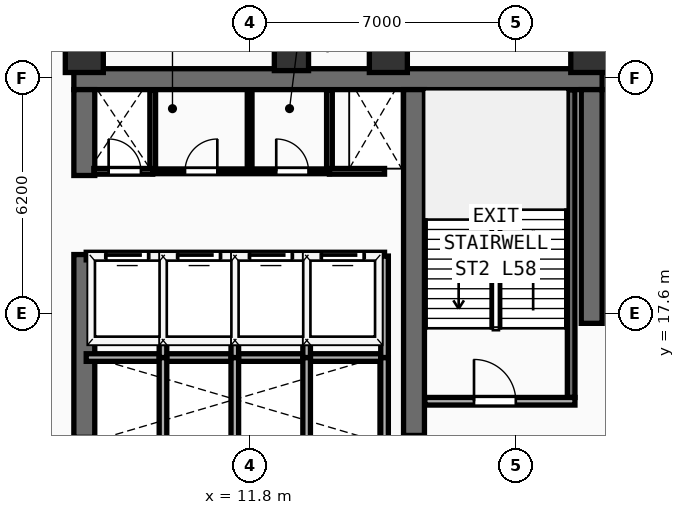
"""IFC4 building model, lengths in metres.
Left out: names, types, materials, properties, quantities, classifications, styles, units other than length and angle.
Written with IfcOpenShell. Run it as: python <this file> out.ifc"""

import sys

from ifc_helpers import new_model, si_unit, direction, frame, frame_2d, origin, origin_2d, place, context, subcontext, project, spatial, rectangle, extrude, element, fill, save


model = new_model("IFC4")
c1 = context("Model", 3, precision=1e-05, world=origin(), true_north=direction((0.0, 1.0)))
c2 = subcontext(c1, "Body", "Model", "MODEL_VIEW")
j1 = project(units=[si_unit("LENGTHUNIT", "METRE"), si_unit("PLANEANGLEUNIT", "RADIAN")], contexts=[c1])
p1 = place(None, origin())
s1 = spatial("IfcSite", under=j1, at=p1, CompositionType="ELEMENT")
p2 = place(p1, origin())
s2 = spatial("IfcBuilding", under=s1, at=p2, CompositionType="ELEMENT")
p3 = place(p2, frame((0.0, 0.0, 227.3)))
s3 = spatial("IfcBuildingStorey", under=s2, at=p3, CompositionType="ELEMENT", Elevation=227.3)
p4 = place(p3, frame((7.175, 23.775, 0.0), z_axis=(0.0, 0.0, 1.0), x_axis=(1.0, 0.0, 0.0)))
e1 = element("IfcWall", 1, at=p4, inside=s3, PredefinedType="SHEAR", context=c2, shape_type="SweptSolid", body=[
    extrude(rectangle(XDim=13.9, YDim=0.55, at=frame_2d((6.95, 0.0))), origin(), (0.0, 0.0, 1.0), 3.56),
])
p5 = place(p3, frame((7.45, 14.35, 0.0), z_axis=(0.0, 0.0, 1.0), x_axis=(0.0, 1.0, 0.0)))
e2 = element("IfcWall", 2, at=p5, inside=s3, PredefinedType="SHEAR", context=c2, shape_type="SweptSolid", body=[
    extrude(rectangle(XDim=4.81, YDim=0.55, at=frame_2d((2.405, 0.0))), origin(), (0.0, 0.0, 1.0), 3.56),
])
p6 = place(p3, frame((7.45, 21.24, 0.0), z_axis=(0.0, 0.0, 1.0), x_axis=(0.0, 1.0, 0.0)))
e3 = element("IfcWall", 3, at=p6, inside=s3, PredefinedType="SHEAR", context=c2, shape_type="SweptSolid", body=[
    extrude(rectangle(XDim=2.26, YDim=0.55, at=frame_2d((1.13, 0.0))), origin(), (0.0, 0.0, 1.0), 3.56),
])
p7 = place(p3, frame((20.8, 17.35, 0.0), z_axis=(0.0, 0.0, 1.0), x_axis=(0.0, 1.0, 0.0)))
e4 = element("IfcWall", 4, at=p7, inside=s3, PredefinedType="SHEAR", context=c2, shape_type="SweptSolid", body=[
    extrude(rectangle(XDim=6.15, YDim=0.55, at=frame_2d((3.075, 0.0))), origin(), (0.0, 0.0, 1.0), 3.56),
])
p8 = place(p3, frame((16.125, 14.4, 0.0), z_axis=(0.0, 0.0, 1.0), x_axis=(0.0, 1.0, 0.0)))
e5 = element("IfcWall", 5, at=p8, inside=s3, PredefinedType="SHEAR", context=c2, shape_type="SweptSolid", body=[
    extrude(rectangle(XDim=9.1, YDim=0.55, at=frame_2d((4.55, 0.0))), origin(), (0.0, 0.0, 1.0), 3.56),
])
for number, where, z_axis, x_axis in (
    (6, (7.45, 24.45, 0.0), (0.0, 0.0, 1.0), (1.0, 0.0, 0.0)),
    (7, (15.45, 24.45, 0.0), (0.0, 0.0, 1.0), (1.0, 0.0, 0.0)),
    (8, (20.75, 24.45, 0.0), (0.0, 0.0, 1.0), (1.0, 0.0, 0.0)),
):
    element("IfcColumn", number, at=place(p3, frame(where, z_axis=z_axis, x_axis=x_axis)), inside=s3, PredefinedType="COLUMN", context=c2, shape_type="SweptSolid", body=[
        extrude(rectangle(XDim=1.0, YDim=1.0, at=origin_2d()), origin(), (0.0, 0.0, 1.0), 3.56),
    ])
p9 = place(p3, frame((12.9, 24.45, 0.0), z_axis=(0.0, 0.0, 1.0), x_axis=(1.0, 0.0, 0.0)))
e9 = element("IfcColumn", 9, at=p9, inside=s3, PredefinedType="COLUMN", context=c2, shape_type="SweptSolid", body=[
    extrude(rectangle(XDim=0.9, YDim=0.9, at=origin_2d()), origin(), (0.0, 0.0, 1.0), 3.56),
])
p10 = place(p3, frame((27.685, 19.775, 0.0), z_axis=(0.0, 0.0, 1.0), x_axis=(-0.707106781187, 0.707106781187, 0.0)))
e10 = element("IfcWall", 10, at=p10, inside=s3, PredefinedType="SOLIDWALL", context=c2, shape_type="SweptSolid", body=[
    extrude(rectangle(XDim=9.207, YDim=0.28, at=frame_2d((4.603, 0.0))), origin(), (0.0, 0.0, 1.0), 3.56),
])
p11 = place(p3, frame((20.26, 15.4, 0.0), z_axis=(0.0, 0.0, 1.0), x_axis=(0.0, 1.0, 0.0)))
e11 = element("IfcWall", 11, at=p11, inside=s3, PredefinedType="SHEAR", context=c2, shape_type="SweptSolid", body=[
    extrude(rectangle(XDim=8.09, YDim=0.2, at=frame_2d((4.045, 0.0))), origin(), (0.0, 0.0, 1.0), 3.56),
])
p12 = place(p3, frame((16.41, 15.3, 0.0), z_axis=(0.0, 0.0, 1.0), x_axis=(1.0, 0.0, 0.0)))
e12 = element("IfcWall", 12, at=p12, inside=s3, PredefinedType="PARTITIONING", context=c2, shape_type="SweptSolid", body=[
    extrude(rectangle(XDim=3.95, YDim=0.2, at=frame_2d((1.975, 0.0))), origin(), (0.0, 0.0, 1.0), 3.56),
])
p13 = place(p12, frame((1.294, 0.0, 0.0)))
e13 = element("IfcOpeningElement", 13, at=p13, cuts=e12, PredefinedType="OPENING", context=c2, shape_type="SweptSolid", body=[
    extrude(rectangle(XDim=1.1, YDim=2.2, at=frame_2d((0.55, 1.1))), frame((0.0, 0.11, 0.0), z_axis=(0.0, -1.0, 0.0), x_axis=(1.0, 0.0, 0.0)), (0.0, 0.0, 1.0), 0.22),
])
p14 = place(p3, frame((7.5, 16.45, 0.0), z_axis=(0.0, 0.0, 1.0), x_axis=(1.0, 0.0, 0.0)))
e14 = element("IfcWall", 14, at=p14, inside=s3, PredefinedType="PARTITIONING", context=c2, shape_type="SweptSolid", body=[
    extrude(rectangle(XDim=7.85, YDim=0.2, at=frame_2d((3.925, 0.0))), origin(), (0.0, 0.0, 1.0), 3.56),
])
for number, where, z_axis, x_axis in (
    (15, (15.35, 14.22, 0.0), (0.0, 0.0, 1.0), (0.0, 1.0, 0.0)),
    (16, (9.52, 14.22, 0.0), (0.0, 0.0, 1.0), (0.0, 1.0, 0.0)),
    (17, (11.41, 14.22, 0.0), (0.0, 0.0, 1.0), (0.0, 1.0, 0.0)),
    (18, (13.3, 14.22, 0.0), (0.0, 0.0, 1.0), (0.0, 1.0, 0.0)),
):
    element("IfcWall", number, at=place(p3, frame(where, z_axis=z_axis, x_axis=x_axis)), inside=s3, PredefinedType="PARTITIONING", context=c2, shape_type="SweptSolid", body=[
        extrude(rectangle(XDim=2.23, YDim=0.2, at=frame_2d((1.115, 0.0))), origin(), (0.0, 0.0, 1.0), 3.56),
    ])
p15 = place(p3, frame((7.5, 19.12, 0.0), z_axis=(0.0, 0.0, 1.0), x_axis=(1.0, 0.0, 0.0)))
e19 = element("IfcWall", 19, at=p15, inside=s3, PredefinedType="PARTITIONING", context=c2, shape_type="SweptSolid", body=[
    extrude(rectangle(XDim=7.85, YDim=0.2, at=frame_2d((3.925, 0.0))), origin(), (0.0, 0.0, 1.0), 3.56),
])
p16 = place(p15, frame((0.53, 0.0, 0.0)))
e20 = element("IfcOpeningElement", 20, at=p16, cuts=e19, PredefinedType="OPENING", context=c2, shape_type="SweptSolid", body=[
    extrude(rectangle(XDim=1.1, YDim=2.2, at=frame_2d((0.55, 1.1))), frame((0.0, 0.11, 0.0), z_axis=(0.0, -1.0, 0.0), x_axis=(1.0, 0.0, 0.0)), (0.0, 0.0, 1.0), 0.22),
])
p17 = place(p15, frame((2.42, 0.0, 0.0)))
e21 = element("IfcOpeningElement", 21, at=p17, cuts=e19, PredefinedType="OPENING", context=c2, shape_type="SweptSolid", body=[
    extrude(rectangle(XDim=1.1, YDim=2.2, at=frame_2d((0.55, 1.1))), frame((0.0, 0.11, 0.0), z_axis=(0.0, -1.0, 0.0), x_axis=(1.0, 0.0, 0.0)), (0.0, 0.0, 1.0), 0.22),
])
p18 = place(p15, frame((4.31, 0.0, 0.0)))
e22 = element("IfcOpeningElement", 22, at=p18, cuts=e19, PredefinedType="OPENING", context=c2, shape_type="SweptSolid", body=[
    extrude(rectangle(XDim=1.1, YDim=2.2, at=frame_2d((0.55, 1.1))), frame((0.0, 0.11, 0.0), z_axis=(0.0, -1.0, 0.0), x_axis=(1.0, 0.0, 0.0)), (0.0, 0.0, 1.0), 0.22),
])
p19 = place(p15, frame((6.2, 0.0, 0.0)))
e23 = element("IfcOpeningElement", 23, at=p19, cuts=e19, PredefinedType="OPENING", context=c2, shape_type="SweptSolid", body=[
    extrude(rectangle(XDim=1.1, YDim=2.2, at=frame_2d((0.55, 1.1))), frame((0.0, 0.11, 0.0), z_axis=(0.0, -1.0, 0.0), x_axis=(1.0, 0.0, 0.0)), (0.0, 0.0, 1.0), 0.22),
])
for number, where, z_axis, x_axis in (
    (24, (15.35, 16.45, 0.0), (0.0, 0.0, 1.0), (0.0, 1.0, 0.0)),
    (25, (9.52, 16.45, 0.0), (0.0, 0.0, 1.0), (0.0, 1.0, 0.0)),
    (26, (11.41, 16.45, 0.0), (0.0, 0.0, 1.0), (0.0, 1.0, 0.0)),
    (27, (13.3, 16.45, 0.0), (0.0, 0.0, 1.0), (0.0, 1.0, 0.0)),
):
    element("IfcWall", number, at=place(p3, frame(where, z_axis=z_axis, x_axis=x_axis)), inside=s3, PredefinedType="PARTITIONING", context=c2, shape_type="SweptSolid", body=[
        extrude(rectangle(XDim=2.67, YDim=0.2, at=frame_2d((1.335, 0.0))), origin(), (0.0, 0.0, 1.0), 3.56),
    ])
for number, where, z_axis, x_axis in (
    (28, (9.25, 21.35, 0.0), (0.0, 0.0, 1.0), (0.0, 1.0, 0.0)),
    (29, (13.9, 21.35, 0.0), (0.0, 0.0, 1.0), (0.0, 1.0, 0.0)),
):
    element("IfcWall", number, at=place(p3, frame(where, z_axis=z_axis, x_axis=x_axis)), inside=s3, PredefinedType="PARTITIONING", context=c2, shape_type="SweptSolid", body=[
        extrude(rectangle(XDim=2.13, YDim=0.15, at=frame_2d((1.065, 0.0))), origin(), (0.0, 0.0, 1.0), 3.56),
    ])
p20 = place(p3, frame((7.7, 21.35, 0.0), z_axis=(0.0, 0.0, 1.0), x_axis=(1.0, 0.0, 0.0)))
e30 = element("IfcWall", 30, at=p20, inside=s3, PredefinedType="PARTITIONING", context=c2, shape_type="SweptSolid", body=[
    extrude(rectangle(XDim=1.55, YDim=0.15, at=frame_2d((0.775, 0.0))), origin(), (0.0, 0.0, 1.0), 3.56),
])
p21 = place(p20, frame((0.39, 0.0, 0.0)))
e31 = element("IfcOpeningElement", 31, at=p21, cuts=e30, PredefinedType="OPENING", context=c2, shape_type="SweptSolid", body=[
    extrude(rectangle(XDim=0.85, YDim=2.15, at=frame_2d((0.425, 1.075))), frame((0.0, 0.085, 0.0), z_axis=(0.0, -1.0, 0.0), x_axis=(1.0, 0.0, 0.0)), (0.0, 0.0, 1.0), 0.17),
])
p22 = place(p3, frame((13.9, 21.35, 0.0), z_axis=(0.0, 0.0, 1.0), x_axis=(1.0, 0.0, 0.0)))
e32 = element("IfcWall", 32, at=p22, inside=s3, PredefinedType="PARTITIONING", context=c2, shape_type="SweptSolid", body=[
    extrude(rectangle(XDim=1.45, YDim=0.15, at=frame_2d((0.725, 0.0))), origin(), (0.0, 0.0, 1.0), 3.56),
])
p23 = place(p3, frame((9.25, 21.35, 0.0), z_axis=(0.0, 0.0, 1.0), x_axis=(1.0, 0.0, 0.0)))
e33 = element("IfcWall", 33, at=p23, inside=s3, PredefinedType="PARTITIONING", context=c2, shape_type="SweptSolid", body=[
    extrude(rectangle(XDim=4.65, YDim=0.125, at=frame_2d((2.325, 0.0))), origin(), (0.0, 0.0, 1.0), 3.56),
])
p24 = place(p23, frame((0.85, 0.0, 0.0)))
e34 = element("IfcOpeningElement", 34, at=p24, cuts=e33, PredefinedType="OPENING", context=c2, shape_type="SweptSolid", body=[
    extrude(rectangle(XDim=0.85, YDim=2.15, at=frame_2d((0.425, 1.075))), frame((0.0, 0.073, 0.0), z_axis=(0.0, -1.0, 0.0), x_axis=(1.0, 0.0, 0.0)), (0.0, 0.0, 1.0), 0.145),
])
p25 = place(p23, frame((3.25, 0.0, 0.0)))
e35 = element("IfcOpeningElement", 35, at=p25, cuts=e33, PredefinedType="OPENING", context=c2, shape_type="SweptSolid", body=[
    extrude(rectangle(XDim=0.85, YDim=2.15, at=frame_2d((0.425, 1.075))), frame((0.0, 0.073, 0.0), z_axis=(0.0, -1.0, 0.0), x_axis=(1.0, 0.0, 0.0)), (0.0, 0.0, 1.0), 0.145),
])
p26 = place(p3, frame((11.8, 21.35, 0.0), z_axis=(0.0, 0.0, 1.0), x_axis=(0.0, 1.0, 0.0)))
e36 = element("IfcWall", 36, at=p26, inside=s3, PredefinedType="PARTITIONING", context=c2, shape_type="SweptSolid", body=[
    extrude(rectangle(XDim=2.13, YDim=0.125, at=frame_2d((1.065, 0.0))), origin(), (0.0, 0.0, 1.0), 3.56),
])
p27 = place(p13, origin())
e37 = element("IfcDoor", 37, at=p27, inside=s3, OperationType="SINGLE_SWING_LEFT", PredefinedType="DOOR", context=c2, shape_type="SweptSolid", body=[
    extrude(rectangle(XDim=1.1, YDim=2.2, at=frame_2d((0.55, 1.1))), frame((0.0, 0.025, 0.0), z_axis=(0.0, -1.0, 0.0), x_axis=(1.0, 0.0, 0.0)), (0.0, 0.0, 1.0), 0.05),
])
fill(e13, e37)
p28 = place(p16, origin())
e38 = element("IfcDoor", 38, at=p28, inside=s3, OperationType="SLIDING_TO_LEFT", PredefinedType="DOOR", context=c2, shape_type="SweptSolid", body=[
    extrude(rectangle(XDim=1.1, YDim=2.2, at=frame_2d((0.55, 1.1))), frame((0.0, 0.025, 0.0), z_axis=(0.0, -1.0, 0.0), x_axis=(1.0, 0.0, 0.0)), (0.0, 0.0, 1.0), 0.05),
])
fill(e20, e38)
p29 = place(p17, origin())
e39 = element("IfcDoor", 39, at=p29, inside=s3, OperationType="SLIDING_TO_LEFT", PredefinedType="DOOR", context=c2, shape_type="SweptSolid", body=[
    extrude(rectangle(XDim=1.1, YDim=2.2, at=frame_2d((0.55, 1.1))), frame((0.0, 0.025, 0.0), z_axis=(0.0, -1.0, 0.0), x_axis=(1.0, 0.0, 0.0)), (0.0, 0.0, 1.0), 0.05),
])
fill(e21, e39)
p30 = place(p18, origin())
e40 = element("IfcDoor", 40, at=p30, inside=s3, OperationType="SLIDING_TO_LEFT", PredefinedType="DOOR", context=c2, shape_type="SweptSolid", body=[
    extrude(rectangle(XDim=1.1, YDim=2.2, at=frame_2d((0.55, 1.1))), frame((0.0, 0.025, 0.0), z_axis=(0.0, -1.0, 0.0), x_axis=(1.0, 0.0, 0.0)), (0.0, 0.0, 1.0), 0.05),
])
fill(e22, e40)
p31 = place(p19, origin())
e41 = element("IfcDoor", 41, at=p31, inside=s3, OperationType="SLIDING_TO_LEFT", PredefinedType="DOOR", context=c2, shape_type="SweptSolid", body=[
    extrude(rectangle(XDim=1.1, YDim=2.2, at=frame_2d((0.55, 1.1))), frame((0.0, 0.025, 0.0), z_axis=(0.0, -1.0, 0.0), x_axis=(1.0, 0.0, 0.0)), (0.0, 0.0, 1.0), 0.05),
])
fill(e23, e41)
p32 = place(p21, origin())
e42 = element("IfcDoor", 42, at=p32, inside=s3, OperationType="SINGLE_SWING_LEFT", PredefinedType="DOOR", context=c2, shape_type="SweptSolid", body=[
    extrude(rectangle(XDim=0.85, YDim=2.15, at=frame_2d((0.425, 1.075))), frame((0.0, 0.025, 0.0), z_axis=(0.0, -1.0, 0.0), x_axis=(1.0, 0.0, 0.0)), (0.0, 0.0, 1.0), 0.05),
])
fill(e31, e42)
p33 = place(p24, origin())
e43 = element("IfcDoor", 43, at=p33, inside=s3, OperationType="SINGLE_SWING_RIGHT", PredefinedType="DOOR", context=c2, shape_type="SweptSolid", body=[
    extrude(rectangle(XDim=0.85, YDim=2.15, at=frame_2d((0.425, 1.075))), frame((0.0, 0.025, 0.0), z_axis=(0.0, -1.0, 0.0), x_axis=(1.0, 0.0, 0.0)), (0.0, 0.0, 1.0), 0.05),
])
fill(e34, e43)
p34 = place(p25, origin())
e44 = element("IfcDoor", 44, at=p34, inside=s3, OperationType="SINGLE_SWING_LEFT", PredefinedType="DOOR", context=c2, shape_type="SweptSolid", body=[
    extrude(rectangle(XDim=0.85, YDim=2.15, at=frame_2d((0.425, 1.075))), frame((0.0, 0.025, 0.0), z_axis=(0.0, -1.0, 0.0), x_axis=(1.0, 0.0, 0.0)), (0.0, 0.0, 1.0), 0.05),
])
fill(e35, e44)
save(model, sys.argv[1])
